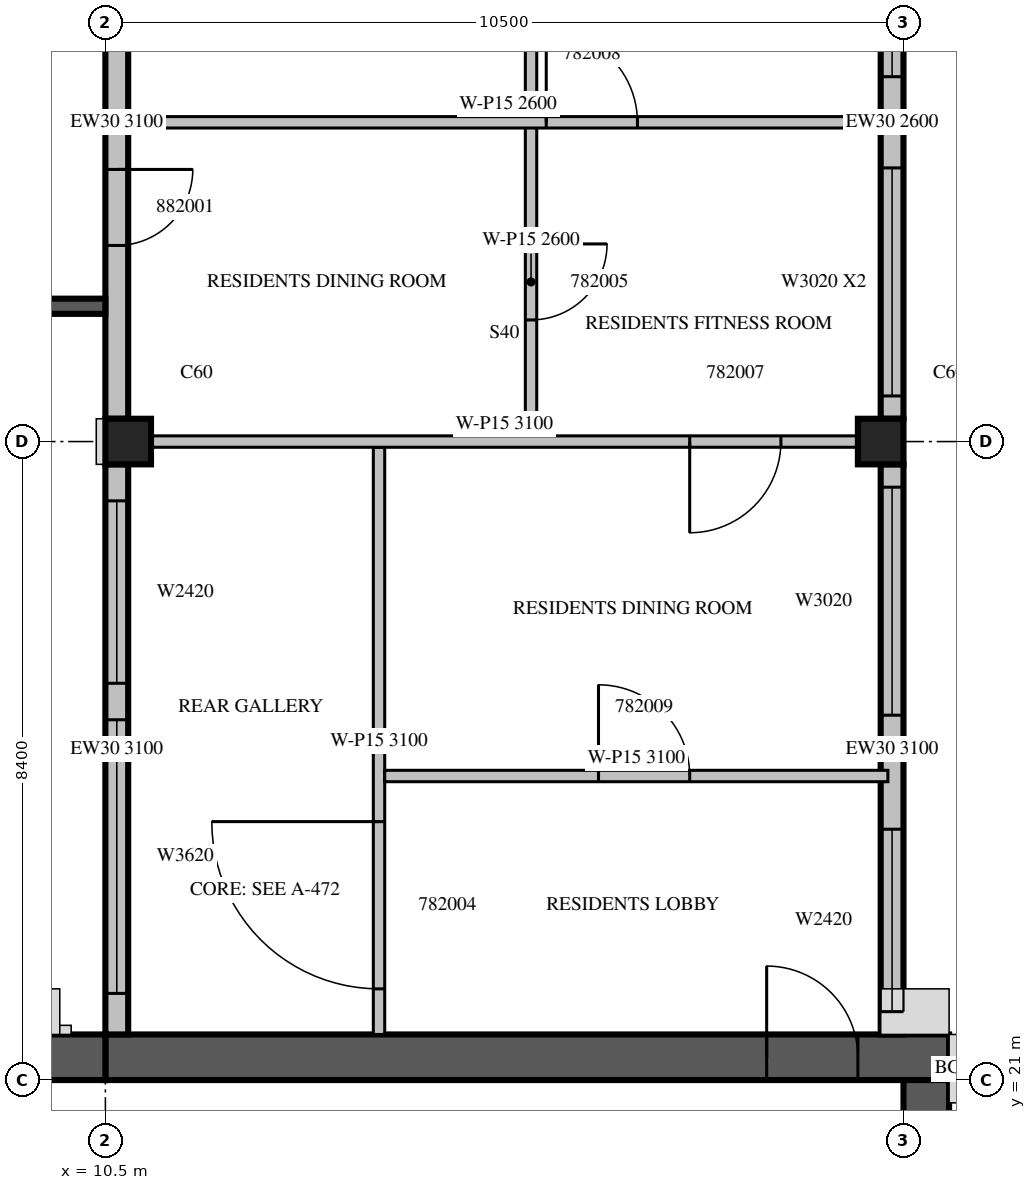
"""IFC4 building model, lengths in metres.
Left out: names, types, materials, properties, quantities, classifications, styles, units other than length and angle.
Written with IfcOpenShell. Run it as: python <this file> out.ifc"""

import sys

from ifc_helpers import new_model, si_unit, direction, frame, frame_2d, origin, origin_2d, place, context, subcontext, project, spatial, rectangle, extrude, source, transform, mapped, element, fill, save


model = new_model("IFC4")
c1 = context("Model", 3, precision=1e-05, world=origin(), true_north=direction((0.0, 1.0)))
c2 = subcontext(c1, "Body", "Model", "MODEL_VIEW")
j1 = project(units=[si_unit("LENGTHUNIT", "METRE"), si_unit("PLANEANGLEUNIT", "RADIAN")], contexts=[c1])
p1 = place(None, origin())
s1 = spatial("IfcSite", under=j1, at=p1, CompositionType="ELEMENT")
p2 = place(p1, origin())
s2 = spatial("IfcBuilding", under=s1, at=p2, CompositionType="ELEMENT")
p3 = place(p2, frame((0.0, 0.0, 347.5)))
s3 = spatial("IfcBuildingStorey", under=s2, at=p3, CompositionType="ELEMENT", Elevation=347.5)
m1 = source(origin(), c2, "Body", "SweptSolid", [
    extrude(rectangle(XDim=0.6, YDim=0.6, at=origin_2d()), origin(), (0.0, 0.0, 1.0), 3.5),
])
for number, where, z_axis, x_axis in (
    (1, (10.8, 29.4, 0.0), (0.0, 0.0, 1.0), (1.0, 0.0, 0.0)),
    (2, (20.7, 29.4, 0.0), (0.0, 0.0, 1.0), (1.0, 0.0, 0.0)),
):
    element("IfcColumn", number, at=place(p3, frame(where, z_axis=z_axis, x_axis=x_axis)), inside=s3, PredefinedType="COLUMN", context=c2, shape_type="MappedRepresentation", body=[
        mapped(m1, transform((0.0, 0.0, 0.0), scale=1.0)),
    ])
m2 = source(origin(), c2, "Body", "SweptSolid", [
    extrude(rectangle(XDim=11.1, YDim=0.6, at=frame_2d((5.55, 0.0))), origin(), (0.0, 0.0, 1.0), 3.5),
])
p4 = place(p3, frame((10.5, 21.3, 0.0), z_axis=(0.0, 0.0, 1.0), x_axis=(1.0, 0.0, 0.0)))
e3 = element("IfcWall", 3, at=p4, inside=s3, PredefinedType="SHEAR", context=c2, shape_type="MappedRepresentation", body=[
    mapped(m2, transform((0.0, 0.0, 0.0), scale=1.0)),
])
m3 = source(origin(), c2, "Body", "SweptSolid", [
    extrude(rectangle(XDim=1.2, YDim=2.1, at=frame_2d((0.6, 1.05))), frame((0.0, 0.31, 0.0), z_axis=(0.0, -1.0, 0.0), x_axis=(1.0, 0.0, 0.0)), (0.0, 0.0, 1.0), 0.62),
])
p5 = place(p4, frame((8.7, 0.0, 0.0)))
e4 = element("IfcOpeningElement", 4, at=p5, cuts=e3, PredefinedType="OPENING", context=c2, shape_type="MappedRepresentation", body=[
    mapped(m3, transform((0.0, 0.0, 0.0), scale=1.0)),
])
m4 = source(origin(), c2, "Body", "SweptSolid", [
    extrude(rectangle(XDim=16.8, YDim=0.6, at=frame_2d((8.4, 0.0))), origin(), (0.0, 0.0, 1.0), 3.5),
])
p6 = place(p3, frame((21.3, 4.2, 0.0), z_axis=(0.0, 0.0, 1.0), x_axis=(0.0, 1.0, 0.0)))
e5 = element("IfcWall", 5, at=p6, inside=s3, PredefinedType="SHEAR", context=c2, shape_type="MappedRepresentation", body=[
    mapped(m4, transform((0.0, 0.0, 0.0), scale=1.0)),
])
p7 = place(p6, frame((4.2, 0.0, 0.0)))
e6 = element("IfcOpeningElement", 6, at=p7, cuts=e5, PredefinedType="OPENING", context=c2, shape_type="MappedRepresentation", body=[
    mapped(m3, transform((0.0, 0.0, 0.0), scale=1.0)),
])
m5 = source(origin(), c2, "Body", "SweptSolid", [
    extrude(rectangle(XDim=1.2, YDim=2.4, at=frame_2d((0.6, 1.2))), frame((0.0, 0.31, 0.0), z_axis=(0.0, -1.0, 0.0), x_axis=(1.0, 0.0, 0.0)), (0.0, 0.0, 1.0), 0.62),
])
p8 = place(p6, frame((12.0, 0.0, 0.6)))
e7 = element("IfcOpeningElement", 7, at=p8, cuts=e5, PredefinedType="OPENING", context=c2, shape_type="MappedRepresentation", body=[
    mapped(m5, transform((0.0, 0.0, 0.0), scale=1.0)),
])
m6 = source(origin(), c2, "Body", "SweptSolid", [
    extrude(rectangle(XDim=6.6, YDim=0.6, at=frame_2d((3.3, 0.0))), origin(), (0.0, 0.0, 1.0), 3.5),
])
p9 = place(p3, frame((3.9, 21.3, 0.0), z_axis=(0.0, 0.0, 1.0), x_axis=(1.0, 0.0, 0.0)))
e8 = element("IfcWall", 8, at=p9, inside=s3, PredefinedType="SHEAR", context=c2, shape_type="MappedRepresentation", body=[
    mapped(m6, transform((0.0, 0.0, 0.0), scale=1.0)),
])
p10 = place(p9, frame((1.5, 0.0, 0.6)))
e9 = element("IfcOpeningElement", 9, at=p10, cuts=e8, PredefinedType="OPENING", context=c2, shape_type="MappedRepresentation", body=[
    mapped(m5, transform((0.0, 0.0, 0.0), scale=1.0)),
])
p11 = place(p9, frame((3.6, 0.0, 0.6)))
e10 = element("IfcOpeningElement", 10, at=p11, cuts=e8, PredefinedType="OPENING", context=c2, shape_type="MappedRepresentation", body=[
    mapped(m5, transform((0.0, 0.0, 0.0), scale=1.0)),
])
m7 = source(origin(), c2, "Body", "SweptSolid", [
    extrude(rectangle(XDim=7.5, YDim=0.3, at=frame_2d((3.75, 0.0))), origin(), (0.0, 0.0, 1.0), 3.1),
])
p12 = place(p3, frame((20.85, 21.6, 0.0), z_axis=(0.0, 0.0, 1.0), x_axis=(0.0, 1.0, 0.0)))
e11 = element("IfcWall", 11, at=p12, inside=s3, PredefinedType="STANDARD", context=c2, shape_type="MappedRepresentation", body=[
    mapped(m7, transform((0.0, 0.0, 0.0), scale=1.0)),
])
m8 = source(origin(), c2, "Body", "SweptSolid", [
    extrude(rectangle(XDim=2.4, YDim=2.0, at=frame_2d((1.2, 1.0))), frame((0.0, 0.16, 0.0), z_axis=(0.0, -1.0, 0.0), x_axis=(1.0, 0.0, 0.0)), (0.0, 0.0, 1.0), 0.32),
])
p13 = place(p12, frame((0.3, 0.0, 0.6)))
e12 = element("IfcOpeningElement", 12, at=p13, cuts=e11, PredefinedType="OPENING", context=c2, shape_type="MappedRepresentation", body=[
    mapped(m8, transform((0.0, 0.0, 0.0), scale=1.0)),
])
m9 = source(origin(), c2, "Body", "SweptSolid", [
    extrude(rectangle(XDim=3.0, YDim=2.0, at=frame_2d((1.5, 1.0))), frame((0.0, 0.16, 0.0), z_axis=(0.0, -1.0, 0.0), x_axis=(1.0, 0.0, 0.0)), (0.0, 0.0, 1.0), 0.32),
])
p14 = place(p12, frame((4.2, 0.0, 0.6)))
e13 = element("IfcOpeningElement", 13, at=p14, cuts=e11, PredefinedType="OPENING", context=c2, shape_type="MappedRepresentation", body=[
    mapped(m9, transform((0.0, 0.0, 0.0), scale=1.0)),
])
m10 = source(origin(), c2, "Body", "SweptSolid", [
    extrude(rectangle(XDim=7.8, YDim=0.3, at=frame_2d((3.9, 0.0))), origin(), (0.0, 0.0, 1.0), 2.6),
])
p15 = place(p3, frame((20.85, 29.7, 0.0), z_axis=(0.0, 0.0, 1.0), x_axis=(0.0, 1.0, 0.0)))
e14 = element("IfcWall", 14, at=p15, inside=s3, PredefinedType="STANDARD", context=c2, shape_type="MappedRepresentation", body=[
    mapped(m10, transform((0.0, 0.0, 0.0), scale=1.0)),
])
p16 = place(p15, frame((0.3, 0.0, 0.6)))
e15 = element("IfcOpeningElement", 15, at=p16, cuts=e14, PredefinedType="OPENING", context=c2, shape_type="MappedRepresentation", body=[
    mapped(m9, transform((0.0, 0.0, 0.0), scale=1.0)),
])
p17 = place(p15, frame((4.5, 0.0, 0.6)))
e16 = element("IfcOpeningElement", 16, at=p17, cuts=e14, PredefinedType="OPENING", context=c2, shape_type="MappedRepresentation", body=[
    mapped(m9, transform((0.0, 0.0, 0.0), scale=1.0)),
])
m11 = source(origin(), c2, "Body", "SweptSolid", [
    extrude(rectangle(XDim=7.8, YDim=0.3, at=frame_2d((3.9, 0.0))), origin(), (0.0, 0.0, 1.0), 3.1),
])
p18 = place(p3, frame((10.65, 37.5, 0.0), z_axis=(0.0, 0.0, 1.0), x_axis=(0.0, -1.0, 0.0)))
e17 = element("IfcWall", 17, at=p18, inside=s3, PredefinedType="STANDARD", context=c2, shape_type="MappedRepresentation", body=[
    mapped(m11, transform((0.0, 0.0, 0.0), scale=1.0)),
])
m12 = source(origin(), c2, "Body", "SweptSolid", [
    extrude(rectangle(XDim=1.0, YDim=2.1, at=frame_2d((0.5, 1.05))), frame((0.0, 0.16, 0.0), z_axis=(0.0, -1.0, 0.0), x_axis=(1.0, 0.0, 0.0)), (0.0, 0.0, 1.0), 0.32),
])
p19 = place(p18, frame((4.52, 0.0, 0.0)))
e18 = element("IfcOpeningElement", 18, at=p19, cuts=e17, PredefinedType="OPENING", context=c2, shape_type="MappedRepresentation", body=[
    mapped(m12, transform((0.0, 0.0, 0.0), scale=1.0)),
])
p20 = place(p3, frame((10.65, 29.1, 0.0), z_axis=(0.0, 0.0, 1.0), x_axis=(0.0, -1.0, 0.0)))
e19 = element("IfcWall", 19, at=p20, inside=s3, PredefinedType="STANDARD", context=c2, shape_type="MappedRepresentation", body=[
    mapped(m7, transform((0.0, 0.0, 0.0), scale=1.0)),
])
m13 = source(origin(), c2, "Body", "SweptSolid", [
    extrude(rectangle(XDim=3.6, YDim=2.0, at=frame_2d((1.8, 1.0))), frame((0.0, 0.16, 0.0), z_axis=(0.0, -1.0, 0.0), x_axis=(1.0, 0.0, 0.0)), (0.0, 0.0, 1.0), 0.32),
])
p21 = place(p20, frame((3.36, 0.0, 0.6)))
e20 = element("IfcOpeningElement", 20, at=p21, cuts=e19, PredefinedType="OPENING", context=c2, shape_type="MappedRepresentation", body=[
    mapped(m13, transform((0.0, 0.0, 0.0), scale=1.0)),
])
p22 = place(p20, frame((0.48, 0.0, 0.6)))
e21 = element("IfcOpeningElement", 21, at=p22, cuts=e19, PredefinedType="OPENING", context=c2, shape_type="MappedRepresentation", body=[
    mapped(m8, transform((0.0, 0.0, 0.0), scale=1.0)),
])
m14 = source(origin(), c2, "Body", "SweptSolid", [
    extrude(rectangle(XDim=3.9, YDim=0.2, at=frame_2d((1.95, 0.0))), origin(), (0.0, 0.0, 1.0), 3.09),
])
p23 = place(p3, frame((10.5, 31.18, 0.0), z_axis=(0.0, 0.0, 1.0), x_axis=(-1.0, 0.0, 0.0)))
e22 = element("IfcWall", 22, at=p23, inside=s3, PredefinedType="SOLIDWALL", context=c2, shape_type="MappedRepresentation", body=[
    mapped(m14, transform((0.0, 0.0, 0.0), scale=1.0)),
])
m15 = source(origin(), c2, "Body", "SweptSolid", [
    extrude(rectangle(XDim=2.4, YDim=2.0, at=frame_2d((1.2, 1.0))), frame((0.0, 0.11, 0.0), z_axis=(0.0, -1.0, 0.0), x_axis=(1.0, 0.0, 0.0)), (0.0, 0.0, 1.0), 0.22),
])
p24 = place(p23, frame((0.75, 0.0, 0.6)))
e23 = element("IfcOpeningElement", 23, at=p24, cuts=e22, PredefinedType="OPENING", context=c2, shape_type="MappedRepresentation", body=[
    mapped(m15, transform((0.0, 0.0, 0.0), scale=1.0)),
])
m16 = source(origin(), c2, "Body", "SweptSolid", [
    extrude(rectangle(XDim=7.725, YDim=0.15, at=frame_2d((3.862, 0.0))), origin(), (0.0, 0.0, 1.0), 3.1),
])
p25 = place(p3, frame((14.1, 29.325, 0.0), z_axis=(0.0, 0.0, 1.0), x_axis=(0.0, -1.0, 0.0)))
e24 = element("IfcWall", 24, at=p25, inside=s3, PredefinedType="PARTITIONING", context=c2, shape_type="MappedRepresentation", body=[
    mapped(m16, transform((0.0, 0.0, 0.0), scale=1.0)),
])
m17 = source(origin(), c2, "Body", "SweptSolid", [
    extrude(rectangle(XDim=2.2, YDim=2.1, at=frame_2d((1.1, 1.05))), frame((0.0, 0.085, 0.0), z_axis=(0.0, -1.0, 0.0), x_axis=(1.0, 0.0, 0.0)), (0.0, 0.0, 1.0), 0.17),
])
p26 = place(p25, frame((4.925, 0.0, 0.0)))
e25 = element("IfcOpeningElement", 25, at=p26, cuts=e24, PredefinedType="OPENING", context=c2, shape_type="MappedRepresentation", body=[
    mapped(m17, transform((0.0, 0.0, 0.0), scale=1.0)),
])
m18 = source(origin(), c2, "Body", "SweptSolid", [
    extrude(rectangle(XDim=6.62, YDim=0.15, at=frame_2d((3.31, 0.0))), origin(), (0.0, 0.0, 1.0), 3.1),
])
p27 = place(p3, frame((14.175, 25.0, 0.0), z_axis=(0.0, 0.0, 1.0), x_axis=(1.0, 0.0, 0.0)))
e26 = element("IfcWall", 26, at=p27, inside=s3, PredefinedType="PARTITIONING", context=c2, shape_type="MappedRepresentation", body=[
    mapped(m18, transform((0.0, 0.0, 0.0), scale=1.0)),
])
m19 = source(origin(), c2, "Body", "SweptSolid", [
    extrude(rectangle(XDim=1.2, YDim=2.1, at=frame_2d((0.6, 1.05))), frame((0.0, 0.085, 0.0), z_axis=(0.0, -1.0, 0.0), x_axis=(1.0, 0.0, 0.0)), (0.0, 0.0, 1.0), 0.17),
])
p28 = place(p27, frame((2.812, 0.0, 0.0)))
e27 = element("IfcOpeningElement", 27, at=p28, cuts=e26, PredefinedType="OPENING", context=c2, shape_type="MappedRepresentation", body=[
    mapped(m19, transform((0.0, 0.0, 0.0), scale=1.0)),
])
m20 = source(origin(), c2, "Body", "SweptSolid", [
    extrude(rectangle(XDim=4.2, YDim=0.15, at=frame_2d((2.1, 0.0))), origin(), (0.0, 0.0, 1.0), 2.6),
])
p29 = place(p3, frame((16.1, 33.6, 0.0), z_axis=(0.0, 0.0, 1.0), x_axis=(0.0, -1.0, 0.0)))
e28 = element("IfcWall", 28, at=p29, inside=s3, PredefinedType="PARTITIONING", context=c2, shape_type="MappedRepresentation", body=[
    mapped(m20, transform((0.0, 0.0, 0.0), scale=1.0)),
])
m21 = source(origin(), c2, "Body", "SweptSolid", [
    extrude(rectangle(XDim=1.0, YDim=2.1, at=frame_2d((0.5, 1.05))), frame((0.0, 0.085, 0.0), z_axis=(0.0, -1.0, 0.0), x_axis=(1.0, 0.0, 0.0)), (0.0, 0.0, 1.0), 0.17),
])
p30 = place(p29, frame((1.6, 0.0, 0.0)))
e29 = element("IfcOpeningElement", 29, at=p30, cuts=e28, PredefinedType="OPENING", context=c2, shape_type="MappedRepresentation", body=[
    mapped(m21, transform((0.0, 0.0, 0.0), scale=1.0)),
])
m22 = source(origin(), c2, "Body", "SweptSolid", [
    extrude(rectangle(XDim=4.105, YDim=0.15, at=frame_2d((2.053, 0.0))), origin(), (0.0, 0.0, 1.0), 2.6),
])
p31 = place(p3, frame((16.1, 37.725, 0.0), z_axis=(0.0, 0.0, 1.0), x_axis=(0.0, -1.0, 0.0)))
e30 = element("IfcWall", 30, at=p31, inside=s3, PredefinedType="PARTITIONING", context=c2, shape_type="MappedRepresentation", body=[
    mapped(m22, transform((0.0, 0.0, 0.0), scale=1.0)),
])
p32 = place(p31, frame((1.525, 0.0, 0.0)))
e31 = element("IfcOpeningElement", 31, at=p32, cuts=e30, PredefinedType="OPENING", context=c2, shape_type="MappedRepresentation", body=[
    mapped(m21, transform((0.0, 0.0, 0.0), scale=1.0)),
])
m23 = source(origin(), c2, "Body", "SweptSolid", [
    extrude(rectangle(XDim=9.302, YDim=0.15, at=frame_2d((4.651, 0.0))), origin(), (0.0, 0.0, 1.0), 3.1),
])
p33 = place(p3, frame((11.099, 29.4, 0.0), z_axis=(0.0, 0.0, 1.0), x_axis=(1.0, 0.0, 0.0)))
e32 = element("IfcWall", 32, at=p33, inside=s3, PredefinedType="PARTITIONING", context=c2, shape_type="MappedRepresentation", body=[
    mapped(m23, transform((0.0, 0.0, 0.0), scale=1.0)),
])
p34 = place(p33, frame((7.088, 0.0, 0.0)))
e33 = element("IfcOpeningElement", 33, at=p34, cuts=e32, PredefinedType="OPENING", context=c2, shape_type="MappedRepresentation", body=[
    mapped(m19, transform((0.0, 0.0, 0.0), scale=1.0)),
])
m24 = source(origin(), c2, "Body", "SweptSolid", [
    extrude(rectangle(XDim=9.995, YDim=0.15, at=frame_2d((4.997, 0.0))), origin(), (0.0, 0.0, 1.0), 2.6),
])
p35 = place(p3, frame((10.8, 33.6, 0.0), z_axis=(0.0, 0.0, 1.0), x_axis=(1.0, 0.0, 0.0)))
e34 = element("IfcWall", 34, at=p35, inside=s3, PredefinedType="PARTITIONING", context=c2, shape_type="MappedRepresentation", body=[
    mapped(m24, transform((0.0, 0.0, 0.0), scale=1.0)),
])
p36 = place(p35, frame((5.5, 0.0, 0.0)))
e35 = element("IfcOpeningElement", 35, at=p36, cuts=e34, PredefinedType="OPENING", context=c2, shape_type="MappedRepresentation", body=[
    mapped(m19, transform((0.0, 0.0, 0.0), scale=1.0)),
])
m25 = source(origin(), c2, "Body", "SweptSolid", [
    extrude(rectangle(XDim=2.4, YDim=2.0, at=frame_2d((1.2, 1.0))), frame((0.0, 0.03, 0.0), z_axis=(0.0, -1.0, 0.0), x_axis=(1.0, 0.0, 0.0)), (0.0, 0.0, 1.0), 0.06),
])
p37 = place(p13, origin())
e36 = element("IfcWindow", 36, at=p37, inside=s3, PartitioningType="SINGLE_PANEL", PredefinedType="WINDOW", context=c2, shape_type="MappedRepresentation", body=[
    mapped(m25, transform((0.0, 0.0, 0.0), scale=1.0)),
])
fill(e12, e36)
m26 = source(origin(), c2, "Body", "SweptSolid", [
    extrude(rectangle(XDim=3.0, YDim=2.0, at=frame_2d((1.5, 1.0))), frame((0.0, 0.03, 0.0), z_axis=(0.0, -1.0, 0.0), x_axis=(1.0, 0.0, 0.0)), (0.0, 0.0, 1.0), 0.06),
])
p38 = place(p14, origin())
e37 = element("IfcWindow", 37, at=p38, inside=s3, PartitioningType="SINGLE_PANEL", PredefinedType="WINDOW", context=c2, shape_type="MappedRepresentation", body=[
    mapped(m26, transform((0.0, 0.0, 0.0), scale=1.0)),
])
fill(e13, e37)
p39 = place(p16, origin())
e38 = element("IfcWindow", 38, at=p39, inside=s3, PartitioningType="SINGLE_PANEL", PredefinedType="WINDOW", context=c2, shape_type="MappedRepresentation", body=[
    mapped(m26, transform((0.0, 0.0, 0.0), scale=1.0)),
])
fill(e15, e38)
p40 = place(p17, origin())
e39 = element("IfcWindow", 39, at=p40, inside=s3, PartitioningType="SINGLE_PANEL", PredefinedType="WINDOW", context=c2, shape_type="MappedRepresentation", body=[
    mapped(m26, transform((0.0, 0.0, 0.0), scale=1.0)),
])
fill(e16, e39)
m27 = source(origin(), c2, "Body", "SweptSolid", [
    extrude(rectangle(XDim=3.6, YDim=2.0, at=frame_2d((1.8, 1.0))), frame((0.0, 0.03, 0.0), z_axis=(0.0, -1.0, 0.0), x_axis=(1.0, 0.0, 0.0)), (0.0, 0.0, 1.0), 0.06),
])
p41 = place(p21, origin())
e40 = element("IfcWindow", 40, at=p41, inside=s3, PartitioningType="SINGLE_PANEL", PredefinedType="WINDOW", context=c2, shape_type="MappedRepresentation", body=[
    mapped(m27, transform((0.0, 0.0, 0.0), scale=1.0)),
])
fill(e20, e40)
p42 = place(p22, origin())
e41 = element("IfcWindow", 41, at=p42, inside=s3, PartitioningType="SINGLE_PANEL", PredefinedType="WINDOW", context=c2, shape_type="MappedRepresentation", body=[
    mapped(m25, transform((0.0, 0.0, 0.0), scale=1.0)),
])
fill(e21, e41)
m28 = source(origin(), c2, "Body", "SweptSolid", [
    extrude(rectangle(XDim=1.2, YDim=2.1, at=frame_2d((0.6, 1.05))), frame((0.0, 0.025, 0.0), z_axis=(0.0, -1.0, 0.0), x_axis=(1.0, 0.0, 0.0)), (0.0, 0.0, 1.0), 0.05),
])
p43 = place(p5, origin())
e42 = element("IfcDoor", 42, at=p43, inside=s3, OperationType="SINGLE_SWING_LEFT", PredefinedType="DOOR", context=c2, shape_type="MappedRepresentation", body=[
    mapped(m28, transform((0.0, 0.0, 0.0), scale=1.0)),
])
fill(e4, e42)
m29 = source(origin(), c2, "Body", "SweptSolid", [
    extrude(rectangle(XDim=2.2, YDim=2.1, at=frame_2d((1.1, 1.05))), frame((0.0, 0.025, 0.0), z_axis=(0.0, -1.0, 0.0), x_axis=(1.0, 0.0, 0.0)), (0.0, 0.0, 1.0), 0.05),
])
p44 = place(p26, origin())
e43 = element("IfcDoor", 43, at=p44, inside=s3, OperationType="DOUBLE_DOOR_SINGLE_SWING", PredefinedType="DOOR", context=c2, shape_type="MappedRepresentation", body=[
    mapped(m29, transform((0.0, 0.0, 0.0), scale=1.0)),
])
fill(e25, e43)
m30 = source(origin(), c2, "Body", "SweptSolid", [
    extrude(rectangle(XDim=1.0, YDim=2.1, at=frame_2d((0.5, 1.05))), frame((0.0, 0.025, 0.0), z_axis=(0.0, -1.0, 0.0), x_axis=(1.0, 0.0, 0.0)), (0.0, 0.0, 1.0), 0.05),
])
p45 = place(p30, origin())
e44 = element("IfcDoor", 44, at=p45, inside=s3, OperationType="SINGLE_SWING_LEFT", PredefinedType="DOOR", context=c2, shape_type="MappedRepresentation", body=[
    mapped(m30, transform((0.0, 0.0, 0.0), scale=1.0)),
])
fill(e29, e44)
p46 = place(p34, origin())
e45 = element("IfcDoor", 45, at=p46, inside=s3, OperationType="SINGLE_SWING_RIGHT", PredefinedType="DOOR", context=c2, shape_type="MappedRepresentation", body=[
    mapped(m28, transform((0.0, 0.0, 0.0), scale=1.0)),
])
fill(e33, e45)
p47 = place(p36, origin())
e46 = element("IfcDoor", 46, at=p47, inside=s3, OperationType="SINGLE_SWING_LEFT", PredefinedType="DOOR", context=c2, shape_type="MappedRepresentation", body=[
    mapped(m28, transform((0.0, 0.0, 0.0), scale=1.0)),
])
fill(e35, e46)
p48 = place(p28, origin())
e47 = element("IfcDoor", 47, at=p48, inside=s3, OperationType="SINGLE_SWING_LEFT", PredefinedType="DOOR", context=c2, shape_type="MappedRepresentation", body=[
    mapped(m28, transform((0.0, 0.0, 0.0), scale=1.0)),
])
fill(e27, e47)
p49 = place(p19, origin())
e48 = element("IfcDoor", 48, at=p49, inside=s3, OperationType="SINGLE_SWING_LEFT", PredefinedType="DOOR", context=c2, shape_type="MappedRepresentation", body=[
    mapped(m30, transform((0.0, 0.0, 0.0), scale=1.0)),
])
fill(e18, e48)
save(model, sys.argv[1])
